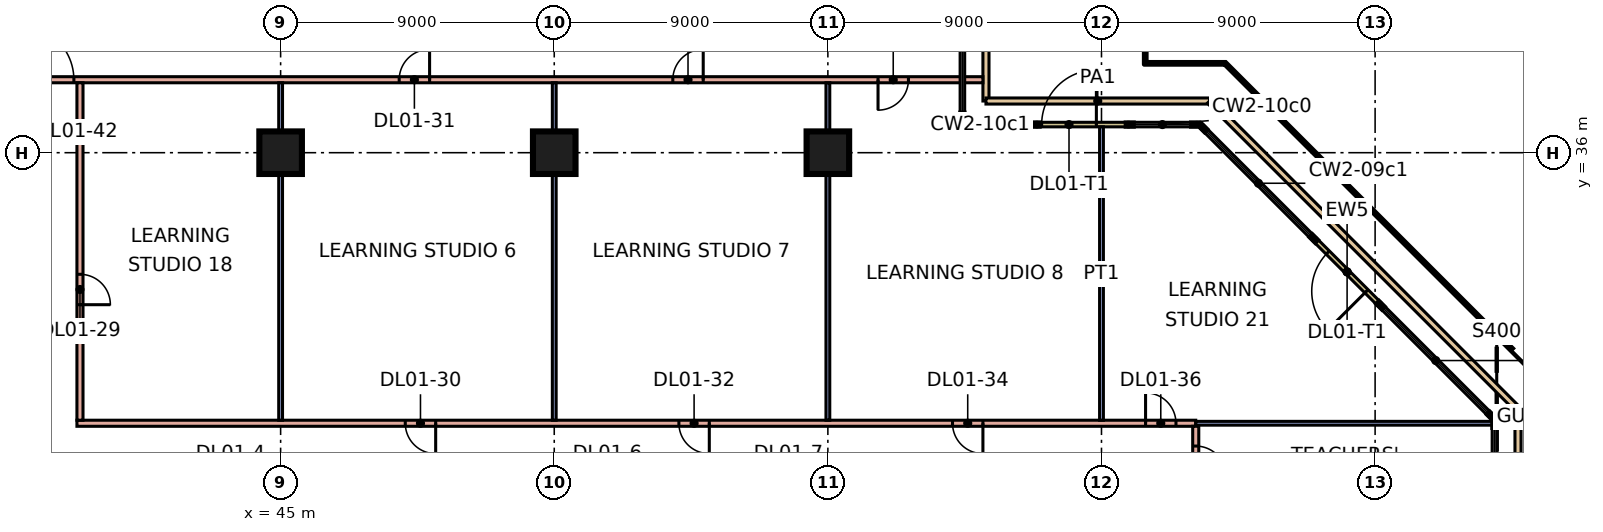
"""IFC4 building model, lengths in metres.
Left out: names, types, materials, properties, quantities, classifications, styles, units other than length and angle.
Written with IfcOpenShell. Run it as: python <this file> out.ifc"""

import sys

from ifc_helpers import new_model, si_unit, direction, frame, frame_2d, origin, origin_2d, place, context, subcontext, project, spatial, rectangle, extrude, element, fill, save


model = new_model("IFC4")
c1 = context("Model", 3, precision=1e-05, world=origin(), true_north=direction((0.0, 1.0)))
c2 = subcontext(c1, "Body", "Model", "MODEL_VIEW")
j1 = project(units=[si_unit("LENGTHUNIT", "METRE"), si_unit("PLANEANGLEUNIT", "RADIAN")], contexts=[c1])
p1 = place(None, origin())
s1 = spatial("IfcSite", under=j1, at=p1, CompositionType="ELEMENT")
p2 = place(p1, origin())
s2 = spatial("IfcBuilding", under=s1, at=p2, CompositionType="ELEMENT")
p3 = place(p2, frame((0.0, 0.0, 7.2)))
s3 = spatial("IfcBuildingStorey", under=s2, at=p3, CompositionType="ELEMENT", Elevation=7.2)
for number, where, z_axis, x_axis in (
    (1, (45.0, 36.0, 0.0), (0.0, 0.0, 1.0), (1.0, 0.0, 0.0)),
    (2, (54.0, 36.0, 0.0), (0.0, 0.0, 1.0), (1.0, 0.0, 0.0)),
    (3, (63.0, 36.0, 0.0), (0.0, 0.0, 1.0), (1.0, 0.0, 0.0)),
):
    element("IfcColumn", number, at=place(p3, frame(where, z_axis=z_axis, x_axis=x_axis)), inside=s3, PredefinedType="COLUMN", context=c2, shape_type="SweptSolid", body=[
        extrude(rectangle(XDim=1.4, YDim=1.4, at=origin_2d()), origin(), (0.0, 0.0, 1.0), 4.8),
    ])
p4 = place(p3, frame((81.139, 31.018, 0.0), z_axis=(0.0, 0.0, 1.0), x_axis=(-0.707106781187, 0.707106781187, 0.0)))
e4 = element("IfcWall", 4, at=p4, inside=s3, PredefinedType="SOLIDWALL", context=c2, shape_type="SweptSolid", body=[
    extrude(rectangle(XDim=3.0, YDim=0.15, at=frame_2d((1.5, 0.0))), origin(), (0.0, 0.0, 1.0), 4.4),
])
p5 = place(p4, frame((0.6, 0.0, 0.0)))
e5 = element("IfcOpeningElement", 5, at=p5, cuts=e4, PredefinedType="OPENING", context=c2, shape_type="SweptSolid", body=[
    extrude(rectangle(XDim=1.8, YDim=2.4, at=frame_2d((0.9, 1.2))), frame((0.0, 0.085, 0.0), z_axis=(0.0, -1.0, 0.0), x_axis=(1.0, 0.0, 0.0)), (0.0, 0.0, 1.0), 0.17),
])
p6 = place(p3, frame((72.882, 36.925, 0.0), z_axis=(0.0, 0.0, 1.0), x_axis=(-1.0, 0.0, 0.0)))
e6 = element("IfcWall", 6, at=p6, inside=s3, PredefinedType="SOLIDWALL", context=c2, shape_type="SweptSolid", body=[
    extrude(rectangle(XDim=3.0, YDim=0.15, at=frame_2d((1.5, 0.0))), origin(), (0.0, 0.0, 1.0), 4.4),
])
p7 = place(p6, frame((1.05, 0.0, 0.0)))
e7 = element("IfcOpeningElement", 7, at=p7, cuts=e6, PredefinedType="OPENING", context=c2, shape_type="SweptSolid", body=[
    extrude(rectangle(XDim=1.8, YDim=2.4, at=frame_2d((0.9, 1.2))), frame((0.0, 0.085, 0.0), z_axis=(0.0, -1.0, 0.0), x_axis=(1.0, 0.0, 0.0)), (0.0, 0.0, 1.0), 0.17),
])
p8 = place(p3, frame((68.2, 68.2, 0.0), z_axis=(0.0, 0.0, 1.0), x_axis=(0.0, -1.0, 0.0)))
e8 = element("IfcWall", 8, at=p8, inside=s3, PredefinedType="PARAPET", context=c2, shape_type="SweptSolid", body=[
    extrude(rectangle(XDim=30.5, YDim=0.2, at=frame_2d((15.25, 0.0))), origin(), (0.0, 0.0, 1.0), 0.5),
])
p9 = place(p3, frame((68.2, 37.7, 0.0), z_axis=(0.0, 0.0, 1.0), x_axis=(1.0, 0.0, 0.0)))
e9 = element("IfcWall", 9, at=p9, inside=s3, PredefinedType="PARAPET", context=c2, shape_type="SweptSolid", body=[
    extrude(rectangle(XDim=7.354, YDim=0.2, at=frame_2d((3.677, 0.0))), origin(), (0.0, 0.0, 1.0), 0.5),
])
p10 = place(p3, frame((75.553, 37.7, 0.0), z_axis=(0.0, 0.0, 1.0), x_axis=(0.707106781187, -0.707106781187, 0.0)))
e10 = element("IfcWall", 10, at=p10, inside=s3, PredefinedType="PARAPET", context=c2, shape_type="SweptSolid", body=[
    extrude(rectangle(XDim=14.349, YDim=0.2, at=frame_2d((7.175, 0.0))), origin(), (0.0, 0.0, 1.0), 0.5),
])
p11 = place(p3, frame((85.7, 27.553, 0.0), z_axis=(0.0, 0.0, 1.0), x_axis=(0.0, -1.0, 0.0)))
e11 = element("IfcWall", 11, at=p11, inside=s3, PredefinedType="PARAPET", context=c2, shape_type="SweptSolid", body=[
    extrude(rectangle(XDim=31.107, YDim=0.2, at=frame_2d((15.553, 0.0))), origin(), (0.0, 0.0, 1.0), 0.5),
])
p12 = place(p3, frame((27.0, 38.4, 0.0), z_axis=(0.0, 0.0, 1.0), x_axis=(1.0, 0.0, 0.0)))
e12 = element("IfcWall", 12, at=p12, inside=s3, PredefinedType="PARTITIONING", context=c2, shape_type="SweptSolid", body=[
    extrude(rectangle(XDim=41.1, YDim=0.2, at=frame_2d((20.55, 0.0))), origin(), (0.0, 0.0, 1.0), 4.4),
])
p13 = place(p12, frame((21.9, 0.0, 0.0)))
e13 = element("IfcOpeningElement", 13, at=p13, cuts=e12, PredefinedType="OPENING", context=c2, shape_type="SweptSolid", body=[
    extrude(rectangle(XDim=1.0, YDim=2.1, at=frame_2d((0.5, 1.05))), frame((0.0, 0.11, 0.0), z_axis=(0.0, -1.0, 0.0), x_axis=(1.0, 0.0, 0.0)), (0.0, 0.0, 1.0), 0.22),
])
p14 = place(p12, frame((30.9, 0.0, 0.0)))
e14 = element("IfcOpeningElement", 14, at=p14, cuts=e12, PredefinedType="OPENING", context=c2, shape_type="SweptSolid", body=[
    extrude(rectangle(XDim=1.0, YDim=2.1, at=frame_2d((0.5, 1.05))), frame((0.0, 0.11, 0.0), z_axis=(0.0, -1.0, 0.0), x_axis=(1.0, 0.0, 0.0)), (0.0, 0.0, 1.0), 0.22),
])
p15 = place(p12, frame((37.65, 0.0, 0.0)))
e15 = element("IfcOpeningElement", 15, at=p15, cuts=e12, PredefinedType="OPENING", context=c2, shape_type="SweptSolid", body=[
    extrude(rectangle(XDim=1.0, YDim=2.1, at=frame_2d((0.5, 1.05))), frame((0.0, 0.11, 0.0), z_axis=(0.0, -1.0, 0.0), x_axis=(1.0, 0.0, 0.0)), (0.0, 0.0, 1.0), 0.22),
])
p16 = place(p12, frame((9.4, 0.0, 0.0)))
e16 = element("IfcOpeningElement", 16, at=p16, cuts=e12, PredefinedType="OPENING", context=c2, shape_type="SweptSolid", body=[
    extrude(rectangle(XDim=1.8, YDim=2.1, at=frame_2d((0.9, 1.05))), frame((0.0, 0.11, 0.0), z_axis=(0.0, -1.0, 0.0), x_axis=(1.0, 0.0, 0.0)), (0.0, 0.0, 1.0), 0.22),
])
p17 = place(p3, frame((38.3, 27.1, 0.0), z_axis=(0.0, 0.0, 1.0), x_axis=(1.0, 0.0, 0.0)))
e17 = element("IfcWall", 17, at=p17, inside=s3, PredefinedType="PARTITIONING", context=c2, shape_type="SweptSolid", body=[
    extrude(rectangle(XDim=36.8, YDim=0.2, at=frame_2d((18.4, 0.0))), origin(), (0.0, 0.0, 1.0), 4.4),
])
p18 = place(p17, frame((10.8, 0.0, 0.0)))
e18 = element("IfcOpeningElement", 18, at=p18, cuts=e17, PredefinedType="OPENING", context=c2, shape_type="SweptSolid", body=[
    extrude(rectangle(XDim=1.0, YDim=2.1, at=frame_2d((0.5, 1.05))), frame((0.0, 0.11, 0.0), z_axis=(0.0, -1.0, 0.0), x_axis=(1.0, 0.0, 0.0)), (0.0, 0.0, 1.0), 0.22),
])
p19 = place(p17, frame((19.8, 0.0, 0.0)))
e19 = element("IfcOpeningElement", 19, at=p19, cuts=e17, PredefinedType="OPENING", context=c2, shape_type="SweptSolid", body=[
    extrude(rectangle(XDim=1.0, YDim=2.1, at=frame_2d((0.5, 1.05))), frame((0.0, 0.11, 0.0), z_axis=(0.0, -1.0, 0.0), x_axis=(1.0, 0.0, 0.0)), (0.0, 0.0, 1.0), 0.22),
])
p20 = place(p17, frame((28.8, 0.0, 0.0)))
e20 = element("IfcOpeningElement", 20, at=p20, cuts=e17, PredefinedType="OPENING", context=c2, shape_type="SweptSolid", body=[
    extrude(rectangle(XDim=1.0, YDim=2.1, at=frame_2d((0.5, 1.05))), frame((0.0, 0.11, 0.0), z_axis=(0.0, -1.0, 0.0), x_axis=(1.0, 0.0, 0.0)), (0.0, 0.0, 1.0), 0.22),
])
p21 = place(p17, frame((35.15, 0.0, 0.0)))
e21 = element("IfcOpeningElement", 21, at=p21, cuts=e17, PredefinedType="OPENING", context=c2, shape_type="SweptSolid", body=[
    extrude(rectangle(XDim=1.0, YDim=2.1, at=frame_2d((0.5, 1.05))), frame((0.0, 0.11, 0.0), z_axis=(0.0, -1.0, 0.0), x_axis=(1.0, 0.0, 0.0)), (0.0, 0.0, 1.0), 0.22),
])
p22 = place(p3, frame((38.4, 27.2, 0.0), z_axis=(0.0, 0.0, 1.0), x_axis=(0.0, 1.0, 0.0)))
e22 = element("IfcWall", 22, at=p22, inside=s3, PredefinedType="PARTITIONING", context=c2, shape_type="SweptSolid", body=[
    extrude(rectangle(XDim=11.1, YDim=0.2, at=frame_2d((5.55, 0.0))), origin(), (0.0, 0.0, 1.0), 4.4),
])
p23 = place(p22, frame((3.8, 0.0, 0.0)))
e23 = element("IfcOpeningElement", 23, at=p23, cuts=e22, PredefinedType="OPENING", context=c2, shape_type="SweptSolid", body=[
    extrude(rectangle(XDim=1.0, YDim=2.1, at=frame_2d((0.5, 1.05))), frame((0.0, 0.11, 0.0), z_axis=(0.0, -1.0, 0.0), x_axis=(1.0, 0.0, 0.0)), (0.0, 0.0, 1.0), 0.22),
])
for number, where, z_axis, x_axis in (
    (24, (45.0, 27.2, 0.0), (0.0, 0.0, 1.0), (0.0, 1.0, 0.0)),
    (25, (54.0, 27.2, 0.0), (0.0, 0.0, 1.0), (0.0, 1.0, 0.0)),
    (26, (63.0, 27.2, 0.0), (0.0, 0.0, 1.0), (0.0, 1.0, 0.0)),
):
    element("IfcWall", number, at=place(p3, frame(where, z_axis=z_axis, x_axis=x_axis)), inside=s3, PredefinedType="PARTITIONING", context=c2, shape_type="SweptSolid", body=[
        extrude(rectangle(XDim=11.1, YDim=0.125, at=frame_2d((5.55, 0.0))), origin(), (0.0, 0.0, 1.0), 4.4),
    ])
p24 = place(p3, frame((72.0, 27.2, 0.0), z_axis=(0.0, 0.0, 1.0), x_axis=(0.0, 1.0, 0.0)))
e27 = element("IfcWall", 27, at=p24, inside=s3, PredefinedType="PARTITIONING", context=c2, shape_type="SweptSolid", body=[
    extrude(rectangle(XDim=9.651, YDim=0.125, at=frame_2d((4.826, 0.0))), origin(), (0.0, 0.0, 1.0), 4.4),
])
p25 = place(p3, frame((75.1, -3.0, 0.0), z_axis=(0.0, 0.0, 1.0), x_axis=(0.0, 1.0, 0.0)))
e28 = element("IfcWall", 28, at=p25, inside=s3, PredefinedType="PARTITIONING", context=c2, shape_type="SweptSolid", body=[
    extrude(rectangle(XDim=30.0, YDim=0.2, at=frame_2d((15.0, 0.0))), origin(), (0.0, 0.0, 1.0), 4.4),
])
p26 = place(p25, frame((0.55, 0.0, 0.0)))
e29 = element("IfcOpeningElement", 29, at=p26, cuts=e28, PredefinedType="OPENING", context=c2, shape_type="SweptSolid", body=[
    extrude(rectangle(XDim=1.0, YDim=2.1, at=frame_2d((0.5, 1.05))), frame((0.0, 0.11, 0.0), z_axis=(0.0, -1.0, 0.0), x_axis=(1.0, 0.0, 0.0)), (0.0, 0.0, 1.0), 0.22),
])
p27 = place(p25, frame((8.4, 0.0, 0.0)))
e30 = element("IfcOpeningElement", 30, at=p27, cuts=e28, PredefinedType="OPENING", context=c2, shape_type="SweptSolid", body=[
    extrude(rectangle(XDim=1.0, YDim=2.1, at=frame_2d((0.5, 1.05))), frame((0.0, 0.11, 0.0), z_axis=(0.0, -1.0, 0.0), x_axis=(1.0, 0.0, 0.0)), (0.0, 0.0, 1.0), 0.22),
])
p28 = place(p25, frame((3.15, 0.0, 0.0)))
e31 = element("IfcOpeningElement", 31, at=p28, cuts=e28, PredefinedType="OPENING", context=c2, shape_type="SweptSolid", body=[
    extrude(rectangle(XDim=1.0, YDim=2.1, at=frame_2d((0.5, 1.05))), frame((0.0, 0.11, 0.0), z_axis=(0.0, -1.0, 0.0), x_axis=(1.0, 0.0, 0.0)), (0.0, 0.0, 1.0), 0.22),
])
p29 = place(p25, frame((22.25, 0.0, 0.0)))
e32 = element("IfcOpeningElement", 32, at=p29, cuts=e28, PredefinedType="OPENING", context=c2, shape_type="SweptSolid", body=[
    extrude(rectangle(XDim=1.0, YDim=2.1, at=frame_2d((0.5, 1.05))), frame((0.0, 0.11, 0.0), z_axis=(0.0, -1.0, 0.0), x_axis=(1.0, 0.0, 0.0)), (0.0, 0.0, 1.0), 0.22),
])
p30 = place(p25, frame((18.75, 0.0, 0.0)))
e33 = element("IfcOpeningElement", 33, at=p30, cuts=e28, PredefinedType="OPENING", context=c2, shape_type="SweptSolid", body=[
    extrude(rectangle(XDim=1.0, YDim=2.1, at=frame_2d((0.5, 1.05))), frame((0.0, 0.11, 0.0), z_axis=(0.0, -1.0, 0.0), x_axis=(1.0, 0.0, 0.0)), (0.0, 0.0, 1.0), 0.22),
])
p31 = place(p25, frame((28.35, 0.0, 0.0)))
e34 = element("IfcOpeningElement", 34, at=p31, cuts=e28, PredefinedType="OPENING", context=c2, shape_type="SweptSolid", body=[
    extrude(rectangle(XDim=1.0, YDim=2.1, at=frame_2d((0.5, 1.05))), frame((0.0, 0.11, 0.0), z_axis=(0.0, -1.0, 0.0), x_axis=(1.0, 0.0, 0.0)), (0.0, 0.0, 1.0), 0.22),
])
p32 = place(p3, frame((75.1, 27.1, 0.0), z_axis=(0.0, 0.0, 1.0), x_axis=(1.0, 0.0, 0.0)))
e35 = element("IfcWall", 35, at=p32, inside=s3, PredefinedType="PARTITIONING", context=c2, shape_type="SweptSolid", body=[
    extrude(rectangle(XDim=10.5, YDim=0.125, at=frame_2d((5.25, 0.0))), origin(), (0.0, 0.0, 1.0), 4.4),
])
p33 = place(p5, origin())
e36 = element("IfcDoor", 36, at=p33, inside=s3, OperationType="DOUBLE_DOOR_SINGLE_SWING", PredefinedType="DOOR", context=c2, shape_type="SweptSolid", body=[
    extrude(rectangle(XDim=1.8, YDim=2.4, at=frame_2d((0.9, 1.2))), frame((0.0, 0.025, 0.0), z_axis=(0.0, -1.0, 0.0), x_axis=(1.0, 0.0, 0.0)), (0.0, 0.0, 1.0), 0.05),
])
fill(e5, e36)
p34 = place(p7, frame((1.8, 0.0, 0.0), z_axis=(0.0, 0.0, 1.0), x_axis=(-1.0, 0.0, 0.0)))
e37 = element("IfcDoor", 37, at=p34, inside=s3, OperationType="DOUBLE_DOOR_SINGLE_SWING", PredefinedType="DOOR", context=c2, shape_type="SweptSolid", body=[
    extrude(rectangle(XDim=1.8, YDim=2.4, at=frame_2d((0.9, 1.2))), frame((0.0, 0.025, 0.0), z_axis=(0.0, -1.0, 0.0), x_axis=(1.0, 0.0, 0.0)), (0.0, 0.0, 1.0), 0.05),
])
fill(e7, e37)
p35 = place(p23, frame((1.0, 0.0, 0.0), z_axis=(0.0, 0.0, 1.0), x_axis=(-1.0, 0.0, 0.0)))
e38 = element("IfcDoor", 38, at=p35, inside=s3, OperationType="SINGLE_SWING_LEFT", PredefinedType="DOOR", context=c2, shape_type="SweptSolid", body=[
    extrude(rectangle(XDim=1.0, YDim=2.1, at=frame_2d((0.5, 1.05))), frame((0.0, 0.025, 0.0), z_axis=(0.0, -1.0, 0.0), x_axis=(1.0, 0.0, 0.0)), (0.0, 0.0, 1.0), 0.05),
])
fill(e23, e38)
p36 = place(p18, origin())
e39 = element("IfcDoor", 39, at=p36, inside=s3, OperationType="SINGLE_SWING_RIGHT", PredefinedType="DOOR", context=c2, shape_type="SweptSolid", body=[
    extrude(rectangle(XDim=1.0, YDim=2.1, at=frame_2d((0.5, 1.05))), frame((0.0, 0.025, 0.0), z_axis=(0.0, -1.0, 0.0), x_axis=(1.0, 0.0, 0.0)), (0.0, 0.0, 1.0), 0.05),
])
fill(e18, e39)
p37 = place(p13, frame((1.0, 0.0, 0.0), z_axis=(0.0, 0.0, 1.0), x_axis=(-1.0, 0.0, 0.0)))
e40 = element("IfcDoor", 40, at=p37, inside=s3, OperationType="SINGLE_SWING_RIGHT", PredefinedType="DOOR", context=c2, shape_type="SweptSolid", body=[
    extrude(rectangle(XDim=1.0, YDim=2.1, at=frame_2d((0.5, 1.05))), frame((0.0, 0.025, 0.0), z_axis=(0.0, -1.0, 0.0), x_axis=(1.0, 0.0, 0.0)), (0.0, 0.0, 1.0), 0.05),
])
fill(e13, e40)
p38 = place(p19, origin())
e41 = element("IfcDoor", 41, at=p38, inside=s3, OperationType="SINGLE_SWING_RIGHT", PredefinedType="DOOR", context=c2, shape_type="SweptSolid", body=[
    extrude(rectangle(XDim=1.0, YDim=2.1, at=frame_2d((0.5, 1.05))), frame((0.0, 0.025, 0.0), z_axis=(0.0, -1.0, 0.0), x_axis=(1.0, 0.0, 0.0)), (0.0, 0.0, 1.0), 0.05),
])
fill(e19, e41)
p39 = place(p14, frame((1.0, 0.0, 0.0), z_axis=(0.0, 0.0, 1.0), x_axis=(-1.0, 0.0, 0.0)))
e42 = element("IfcDoor", 42, at=p39, inside=s3, OperationType="SINGLE_SWING_RIGHT", PredefinedType="DOOR", context=c2, shape_type="SweptSolid", body=[
    extrude(rectangle(XDim=1.0, YDim=2.1, at=frame_2d((0.5, 1.05))), frame((0.0, 0.025, 0.0), z_axis=(0.0, -1.0, 0.0), x_axis=(1.0, 0.0, 0.0)), (0.0, 0.0, 1.0), 0.05),
])
fill(e14, e42)
p40 = place(p20, origin())
e43 = element("IfcDoor", 43, at=p40, inside=s3, OperationType="SINGLE_SWING_RIGHT", PredefinedType="DOOR", context=c2, shape_type="SweptSolid", body=[
    extrude(rectangle(XDim=1.0, YDim=2.1, at=frame_2d((0.5, 1.05))), frame((0.0, 0.025, 0.0), z_axis=(0.0, -1.0, 0.0), x_axis=(1.0, 0.0, 0.0)), (0.0, 0.0, 1.0), 0.05),
])
fill(e20, e43)
p41 = place(p15, frame((1.0, 0.0, 0.0), z_axis=(0.0, 0.0, 1.0), x_axis=(-1.0, 0.0, 0.0)))
e44 = element("IfcDoor", 44, at=p41, inside=s3, OperationType="SINGLE_SWING_LEFT", PredefinedType="DOOR", context=c2, shape_type="SweptSolid", body=[
    extrude(rectangle(XDim=1.0, YDim=2.1, at=frame_2d((0.5, 1.05))), frame((0.0, 0.025, 0.0), z_axis=(0.0, -1.0, 0.0), x_axis=(1.0, 0.0, 0.0)), (0.0, 0.0, 1.0), 0.05),
])
fill(e15, e44)
p42 = place(p21, origin())
e45 = element("IfcDoor", 45, at=p42, inside=s3, OperationType="SINGLE_SWING_LEFT", PredefinedType="DOOR", context=c2, shape_type="SweptSolid", body=[
    extrude(rectangle(XDim=1.0, YDim=2.1, at=frame_2d((0.5, 1.05))), frame((0.0, 0.025, 0.0), z_axis=(0.0, -1.0, 0.0), x_axis=(1.0, 0.0, 0.0)), (0.0, 0.0, 1.0), 0.05),
])
fill(e21, e45)
p43 = place(p16, origin())
e46 = element("IfcDoor", 46, at=p43, inside=s3, OperationType="DOUBLE_DOOR_SINGLE_SWING", PredefinedType="DOOR", context=c2, shape_type="SweptSolid", body=[
    extrude(rectangle(XDim=1.8, YDim=2.1, at=frame_2d((0.9, 1.05))), frame((0.0, 0.025, 0.0), z_axis=(0.0, -1.0, 0.0), x_axis=(1.0, 0.0, 0.0)), (0.0, 0.0, 1.0), 0.05),
])
fill(e16, e46)
p44 = place(p31, frame((1.0, 0.0, 0.0), z_axis=(0.0, 0.0, 1.0), x_axis=(-1.0, 0.0, 0.0)))
e47 = element("IfcDoor", 47, at=p44, inside=s3, OperationType="SINGLE_SWING_LEFT", PredefinedType="DOOR", context=c2, shape_type="SweptSolid", body=[
    extrude(rectangle(XDim=1.0, YDim=2.1, at=frame_2d((0.5, 1.05))), frame((0.0, 0.025, 0.0), z_axis=(0.0, -1.0, 0.0), x_axis=(1.0, 0.0, 0.0)), (0.0, 0.0, 1.0), 0.05),
])
fill(e34, e47)
save(model, sys.argv[1])
